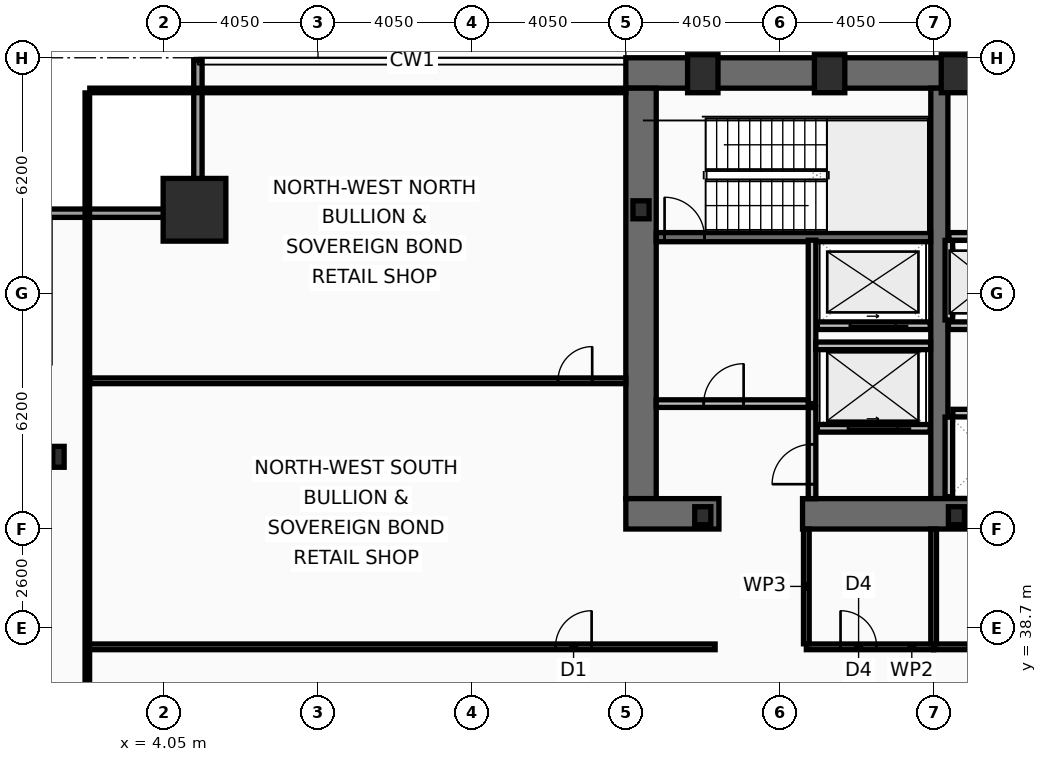
"""IFC4 building model, lengths in metres.
Left out: names, types, materials, properties, quantities, classifications, styles, units other than length and angle.
Written with IfcOpenShell. Run it as: python <this file> out.ifc"""

import sys

from ifc_helpers import new_model, si_unit, direction, frame, frame_2d, origin, origin_2d, place, context, subcontext, project, spatial, rectangle, hollow_rectangle, i_section, extrude, element, fill, save


model = new_model("IFC4")
c1 = context("Model", 3, precision=1e-05, world=origin(), true_north=direction((0.0, 1.0)))
c2 = subcontext(c1, "Body", "Model", "MODEL_VIEW")
j1 = project(units=[si_unit("LENGTHUNIT", "METRE"), si_unit("PLANEANGLEUNIT", "RADIAN")], contexts=[c1])
p1 = place(None, origin())
s1 = spatial("IfcSite", under=j1, at=p1, CompositionType="ELEMENT")
p2 = place(p1, origin())
s2 = spatial("IfcBuilding", under=s1, at=p2, CompositionType="ELEMENT")
p3 = place(p2, frame((0.0, 0.0, 65.8)))
s3 = spatial("IfcBuildingStorey", under=s2, at=p3, CompositionType="ELEMENT", Elevation=65.8)
p4 = place(p3, frame((16.2, 53.3, 0.0), z_axis=(0.0, 0.0, 1.0), x_axis=(1.0, 0.0, 0.0)))
e1 = element("IfcWall", 1, at=p4, inside=s3, PredefinedType="SHEAR", context=c2, shape_type="SweptSolid", body=[
    extrude(rectangle(XDim=40.5, YDim=0.8, at=frame_2d((20.25, 0.0))), origin(), (0.0, 0.0, 1.0), 3.82),
])
p5 = place(p3, frame((16.6, 42.1, 0.0), z_axis=(0.0, 0.0, 1.0), x_axis=(0.0, 1.0, 0.0)))
e2 = element("IfcWall", 2, at=p5, inside=s3, PredefinedType="SHEAR", context=c2, shape_type="SweptSolid", body=[
    extrude(rectangle(XDim=10.8, YDim=0.8, at=frame_2d((5.4, 0.0))), origin(), (0.0, 0.0, 1.0), 3.82),
])
p6 = place(p3, frame((24.45, 42.1, 0.0), z_axis=(0.0, 0.0, 1.0), x_axis=(0.0, 1.0, 0.0)))
e3 = element("IfcWall", 3, at=p6, inside=s3, PredefinedType="SHEAR", context=c2, shape_type="SweptSolid", body=[
    extrude(rectangle(XDim=10.8, YDim=0.45, at=frame_2d((5.4, 0.0))), origin(), (0.0, 0.0, 1.0), 3.82),
])
p7 = place(p3, frame((18.65, 41.7, 0.0), z_axis=(0.0, 0.0, 1.0), x_axis=(-1.0, 0.0, 0.0)))
e4 = element("IfcWall", 4, at=p7, inside=s3, PredefinedType="SHEAR", context=c2, shape_type="SweptSolid", body=[
    extrude(rectangle(XDim=2.45, YDim=0.8, at=frame_2d((1.225, 0.0))), origin(), (0.0, 0.0, 1.0), 3.82),
])
p8 = place(p3, frame((32.3, 41.7, 0.0), z_axis=(0.0, 0.0, 1.0), x_axis=(-1.0, 0.0, 0.0)))
e5 = element("IfcWall", 5, at=p8, inside=s3, PredefinedType="SHEAR", context=c2, shape_type="SweptSolid", body=[
    extrude(rectangle(XDim=11.45, YDim=0.8, at=frame_2d((5.725, 0.0))), origin(), (0.0, 0.0, 1.0), 3.82),
])
p9 = place(p3, frame((17.0, 48.98, 0.0), z_axis=(0.0, 0.0, 1.0), x_axis=(1.0, 0.0, 0.0)))
e6 = element("IfcWall", 6, at=p9, inside=s3, PredefinedType="SHEAR", context=c2, shape_type="SweptSolid", body=[
    extrude(rectangle(XDim=7.22, YDim=0.24, at=frame_2d((3.61, 0.0))), origin(), (0.0, 0.0, 1.0), 3.82),
])
p10 = place(p9, frame((0.22, 0.0, 0.0)))
e7 = element("IfcOpeningElement", 7, at=p10, cuts=e6, PredefinedType="OPENING", context=c2, shape_type="SweptSolid", body=[
    extrude(rectangle(XDim=1.05, YDim=2.15, at=frame_2d((0.525, 1.075))), frame((0.0, 0.13, 0.0), z_axis=(0.0, -1.0, 0.0), x_axis=(1.0, 0.0, 0.0)), (0.0, 0.0, 1.0), 0.26),
])
p11 = place(p3, frame((4.85, 49.7, 0.0), z_axis=(0.0, 0.0, 1.0), x_axis=(1.0, 0.0, 0.0)))
e8 = element("IfcColumn", 8, at=p11, inside=s3, PredefinedType="COLUMN", context=c2, shape_type="SweptSolid", body=[
    extrude(hollow_rectangle(XDim=1.65, YDim=1.65, WallThickness=0.075, at=origin_2d()), origin(), (0.0, 0.0, 1.0), 4.0),
])
for number, where, z_axis, x_axis in (
    (9, (18.225, 53.28, 0.0), (0.0, 0.0, 1.0), (1.0, 0.0, 0.0)),
    (10, (21.562, 53.28, 0.0), (0.0, 0.0, 1.0), (1.0, 0.0, 0.0)),
    (11, (24.9, 53.28, 0.0), (0.0, 0.0, 1.0), (1.0, 0.0, 0.0)),
):
    element("IfcColumn", number, at=place(p3, frame(where, z_axis=z_axis, x_axis=x_axis)), inside=s3, PredefinedType="COLUMN", context=c2, shape_type="SweptSolid", body=[
        extrude(hollow_rectangle(XDim=0.8, YDim=1.0, WallThickness=0.055, at=origin_2d()), origin(), (0.0, 0.0, 1.0), 4.0),
    ])
p12 = place(p3, frame((1.27, 43.2, 0.0), z_axis=(0.0, 0.0, 1.0), x_axis=(1.0, 0.0, 0.0)))
e12 = element("IfcColumn", 12, at=p12, inside=s3, PredefinedType="COLUMN", context=c2, shape_type="SweptSolid", body=[
    extrude(i_section(OverallWidth=0.3, OverallDepth=0.55, WebThickness=0.015, FlangeThickness=0.029, at=origin_2d()), origin(), (0.0, 0.0, 1.0), 4.0),
])
for number, where, z_axis, x_axis in (
    (13, (16.6, 49.7, 0.0), (0.0, 0.0, 1.0), (1.0, 0.0, 0.0)),
    (14, (18.225, 41.65, 0.0), (0.0, 0.0, 1.0), (1.0, 0.0, 0.0)),
    (15, (24.9, 41.65, 0.0), (0.0, 0.0, 1.0), (1.0, 0.0, 0.0)),
):
    element("IfcColumn", number, at=place(p3, frame(where, z_axis=z_axis, x_axis=x_axis)), inside=s3, PredefinedType="COLUMN", context=c2, shape_type="SweptSolid", body=[
        extrude(i_section(OverallWidth=0.424, OverallDepth=0.474, WebThickness=0.048, FlangeThickness=0.077, at=origin_2d()), origin(), (0.0, 0.0, 1.0), 4.0),
    ])
p13 = place(p3, frame((0.83, 49.61, 0.0), z_axis=(0.0, 0.0, 1.0), x_axis=(1.0, 0.0, 0.0)))
e16 = element("IfcWall", 16, at=p13, inside=s3, PredefinedType="SOLIDWALL", context=c2, shape_type="SweptSolid", body=[
    extrude(rectangle(XDim=4.22, YDim=0.22, at=frame_2d((2.11, 0.0))), origin(), (0.0, 0.0, 1.0), 3.16),
])
p14 = place(p3, frame((4.94, 49.72, 0.0), z_axis=(0.0, 0.0, 1.0), x_axis=(0.0, 1.0, 0.0)))
e17 = element("IfcWall", 17, at=p14, inside=s3, PredefinedType="SOLIDWALL", context=c2, shape_type="SweptSolid", body=[
    extrude(rectangle(XDim=3.91, YDim=0.22, at=frame_2d((1.955, 0.0))), origin(), (0.0, 0.0, 1.0), 3.16),
])
p15 = place(p3, frame((24.21, 43.95, 0.0), z_axis=(0.0, 0.0, 1.0), x_axis=(-1.0, 0.0, 0.0)))
e18 = element("IfcWall", 18, at=p15, inside=s3, PredefinedType="PARTITIONING", context=c2, shape_type="SweptSolid", body=[
    extrude(rectangle(XDim=2.97, YDim=0.2, at=frame_2d((1.485, 0.0))), origin(), (0.0, 0.0, 1.0), 3.82),
])
p16 = place(p15, frame((0.86, 0.0, 0.0)))
e19 = element("IfcOpeningElement", 19, at=p16, cuts=e18, PredefinedType="OPENING", context=c2, shape_type="SweptSolid", body=[
    extrude(rectangle(XDim=1.3, YDim=2.18, at=frame_2d((0.65, 1.09))), frame((0.0, 0.11, 0.0), z_axis=(0.0, -1.0, 0.0), x_axis=(1.0, 0.0, 0.0)), (0.0, 0.0, 1.0), 0.22),
])
p17 = place(p3, frame((24.21, 46.65, 0.0), z_axis=(0.0, 0.0, 1.0), x_axis=(-1.0, 0.0, 0.0)))
e20 = element("IfcWall", 20, at=p17, inside=s3, PredefinedType="PARTITIONING", context=c2, shape_type="SweptSolid", body=[
    extrude(rectangle(XDim=2.97, YDim=0.2, at=frame_2d((1.485, 0.0))), origin(), (0.0, 0.0, 1.0), 3.82),
])
p18 = place(p17, frame((0.91, 0.0, 0.0)))
e21 = element("IfcOpeningElement", 21, at=p18, cuts=e20, PredefinedType="OPENING", context=c2, shape_type="SweptSolid", body=[
    extrude(rectangle(XDim=1.2, YDim=2.18, at=frame_2d((0.6, 1.09))), frame((0.0, 0.11, 0.0), z_axis=(0.0, -1.0, 0.0), x_axis=(1.0, 0.0, 0.0)), (0.0, 0.0, 1.0), 0.22),
])
p19 = place(p3, frame((31.22, 46.65, 0.0), z_axis=(0.0, 0.0, 1.0), x_axis=(-1.0, 0.0, 0.0)))
e22 = element("IfcWall", 22, at=p19, inside=s3, PredefinedType="PARTITIONING", context=c2, shape_type="SweptSolid", body=[
    extrude(rectangle(XDim=6.53, YDim=0.2, at=frame_2d((3.265, 0.0))), origin(), (0.0, 0.0, 1.0), 3.82),
])
p20 = place(p19, frame((4.9, 0.0, 0.0)))
e23 = element("IfcOpeningElement", 23, at=p20, cuts=e22, PredefinedType="OPENING", context=c2, shape_type="SweptSolid", body=[
    extrude(rectangle(XDim=1.1, YDim=2.18, at=frame_2d((0.55, 1.09))), frame((0.0, 0.11, 0.0), z_axis=(0.0, -1.0, 0.0), x_axis=(1.0, 0.0, 0.0)), (0.0, 0.0, 1.0), 0.22),
])
p21 = place(p19, frame((2.74, 0.0, 0.0)))
e24 = element("IfcOpeningElement", 24, at=p21, cuts=e22, PredefinedType="OPENING", context=c2, shape_type="SweptSolid", body=[
    extrude(rectangle(XDim=1.1, YDim=2.18, at=frame_2d((0.55, 1.09))), frame((0.0, 0.11, 0.0), z_axis=(0.0, -1.0, 0.0), x_axis=(1.0, 0.0, 0.0)), (0.0, 0.0, 1.0), 0.22),
])
p22 = place(p19, frame((0.58, 0.0, 0.0)))
e25 = element("IfcOpeningElement", 25, at=p22, cuts=e22, PredefinedType="OPENING", context=c2, shape_type="SweptSolid", body=[
    extrude(rectangle(XDim=1.1, YDim=2.18, at=frame_2d((0.55, 1.09))), frame((0.0, 0.11, 0.0), z_axis=(0.0, -1.0, 0.0), x_axis=(1.0, 0.0, 0.0)), (0.0, 0.0, 1.0), 0.22),
])
p23 = place(p3, frame((21.1, 44.6, 0.0), z_axis=(0.0, 0.0, 1.0), x_axis=(0.0, 1.0, 0.0)))
e26 = element("IfcWall", 26, at=p23, inside=s3, PredefinedType="PARTITIONING", context=c2, shape_type="SweptSolid", body=[
    extrude(rectangle(XDim=4.3, YDim=0.2, at=frame_2d((2.15, 0.0))), origin(), (0.0, 0.0, 1.0), 3.82),
])
p24 = place(p3, frame((17.0, 44.6, 0.0), z_axis=(0.0, 0.0, 1.0), x_axis=(1.0, 0.0, 0.0)))
e27 = element("IfcWall", 27, at=p24, inside=s3, PredefinedType="PARTITIONING", context=c2, shape_type="SweptSolid", body=[
    extrude(rectangle(XDim=4.0, YDim=0.2, at=frame_2d((2.0, 0.0))), origin(), (0.0, 0.0, 1.0), 3.82),
])
p25 = place(p24, frame((1.25, 0.0, 0.0)))
e28 = element("IfcOpeningElement", 28, at=p25, cuts=e27, PredefinedType="OPENING", context=c2, shape_type="SweptSolid", body=[
    extrude(rectangle(XDim=1.05, YDim=2.15, at=frame_2d((0.525, 1.075))), frame((0.0, 0.11, 0.0), z_axis=(0.0, -1.0, 0.0), x_axis=(1.0, 0.0, 0.0)), (0.0, 0.0, 1.0), 0.22),
])
p26 = place(p3, frame((21.2, 46.12, 0.0), z_axis=(0.0, 0.0, 1.0), x_axis=(1.0, 0.0, 0.0)))
e29 = element("IfcWall", 29, at=p26, inside=s3, PredefinedType="PARTITIONING", context=c2, shape_type="SweptSolid", body=[
    extrude(rectangle(XDim=3.02, YDim=0.2, at=frame_2d((1.51, 0.0))), origin(), (0.0, 0.0, 1.0), 3.82),
])
p27 = place(p3, frame((21.1, 42.1, 0.0), z_axis=(0.0, 0.0, 1.0), x_axis=(0.0, 1.0, 0.0)))
e30 = element("IfcWall", 30, at=p27, inside=s3, PredefinedType="PARTITIONING", context=c2, shape_type="SweptSolid", body=[
    extrude(rectangle(XDim=2.395, YDim=0.2, at=frame_2d((1.198, 0.0))), origin(), (0.0, 0.0, 1.0), 3.82),
])
p28 = place(p27, frame((0.38, 0.0, 0.0)))
e31 = element("IfcOpeningElement", 31, at=p28, cuts=e30, PredefinedType="OPENING", context=c2, shape_type="SweptSolid", body=[
    extrude(rectangle(XDim=1.05, YDim=2.15, at=frame_2d((0.525, 1.075))), frame((0.0, 0.11, 0.0), z_axis=(0.0, -1.0, 0.0), x_axis=(1.0, 0.0, 0.0)), (0.0, 0.0, 1.0), 0.22),
])
p29 = place(p3, frame((24.7, 46.8, 0.0), z_axis=(0.0, 0.0, 1.0), x_axis=(0.0, 1.0, 0.0)))
e32 = element("IfcWall", 32, at=p29, inside=s3, PredefinedType="PARTITIONING", context=c2, shape_type="SweptSolid", body=[
    extrude(rectangle(XDim=2.095, YDim=0.2, at=frame_2d((1.047, 0.0))), origin(), (0.0, 0.0, 1.0), 3.82),
])
p30 = place(p3, frame((24.805, 44.35, 0.0), z_axis=(0.0, 0.0, 1.0), x_axis=(1.0, 0.0, 0.0)))
e33 = element("IfcWall", 33, at=p30, inside=s3, PredefinedType="PARTITIONING", context=c2, shape_type="SweptSolid", body=[
    extrude(rectangle(XDim=6.27, YDim=0.2, at=frame_2d((3.135, 0.0))), origin(), (0.0, 0.0, 1.0), 3.82),
])
p31 = place(p3, frame((24.7, 42.15, 0.0), z_axis=(0.0, 0.0, 1.0), x_axis=(0.0, 1.0, 0.0)))
e34 = element("IfcWall", 34, at=p31, inside=s3, PredefinedType="PARTITIONING", context=c2, shape_type="SweptSolid", body=[
    extrude(rectangle(XDim=2.095, YDim=0.2, at=frame_2d((1.048, 0.0))), origin(), (0.0, 0.0, 1.0), 3.82),
])
p32 = place(p3, frame((24.7, 52.86, 0.0), z_axis=(0.0, 0.0, 1.0), x_axis=(1.0, 0.0, 0.0)))
e35 = element("IfcWall", 35, at=p32, inside=s3, PredefinedType="PARTITIONING", context=c2, shape_type="SweptSolid", body=[
    extrude(rectangle(XDim=7.72, YDim=0.12, at=frame_2d((3.86, 0.0))), origin(), (0.0, 0.0, 1.0), 3.82),
])
p33 = place(p3, frame((24.7, 49.0, 0.0), z_axis=(0.0, 0.0, 1.0), x_axis=(1.0, 0.0, 0.0)))
e36 = element("IfcWall", 36, at=p33, inside=s3, PredefinedType="PARTITIONING", context=c2, shape_type="SweptSolid", body=[
    extrude(rectangle(XDim=7.72, YDim=0.2, at=frame_2d((3.86, 0.0))), origin(), (0.0, 0.0, 1.0), 3.82),
])
p34 = place(p33, frame((6.56, 0.0, 0.0)))
e37 = element("IfcOpeningElement", 37, at=p34, cuts=e36, PredefinedType="OPENING", context=c2, shape_type="SweptSolid", body=[
    extrude(rectangle(XDim=0.95, YDim=2.1, at=frame_2d((0.475, 1.05))), frame((0.0, 0.11, 0.0), z_axis=(0.0, -1.0, 0.0), x_axis=(1.0, 0.0, 0.0)), (0.0, 0.0, 1.0), 0.22),
])
p35 = place(p3, frame((20.95, 38.2, 0.0), z_axis=(0.0, 0.0, 1.0), x_axis=(1.0, 0.0, 0.0)))
e38 = element("IfcWall", 38, at=p35, inside=s3, PredefinedType="PARTITIONING", context=c2, shape_type="SweptSolid", body=[
    extrude(rectangle(XDim=3.35, YDim=0.15, at=frame_2d((1.675, 0.0))), origin(), (0.0, 0.0, 1.0), 3.82),
])
p36 = place(p35, frame((0.9, 0.0, 0.0)))
e39 = element("IfcOpeningElement", 39, at=p36, cuts=e38, PredefinedType="OPENING", context=c2, shape_type="SweptSolid", body=[
    extrude(rectangle(XDim=0.95, YDim=2.05, at=frame_2d((0.475, 1.025))), frame((0.0, 0.085, 0.0), z_axis=(0.0, -1.0, 0.0), x_axis=(1.0, 0.0, 0.0)), (0.0, 0.0, 1.0), 0.17),
])
p37 = place(p3, frame((24.3, 38.2, 0.0), z_axis=(0.0, 0.0, 1.0), x_axis=(1.0, 0.0, 0.0)))
e40 = element("IfcWall", 40, at=p37, inside=s3, PredefinedType="PARTITIONING", context=c2, shape_type="SweptSolid", body=[
    extrude(rectangle(XDim=4.9, YDim=0.15, at=frame_2d((2.45, 0.0))), origin(), (0.0, 0.0, 1.0), 3.01),
])
p38 = place(p37, frame((0.9, 0.0, 0.0)))
e41 = element("IfcOpeningElement", 41, at=p38, cuts=e40, PredefinedType="OPENING", context=c2, shape_type="SweptSolid", body=[
    extrude(rectangle(XDim=0.95, YDim=2.05, at=frame_2d((0.475, 1.025))), frame((0.0, 0.085, 0.0), z_axis=(0.0, -1.0, 0.0), x_axis=(1.0, 0.0, 0.0)), (0.0, 0.0, 1.0), 0.17),
])
for number, where, z_axis, x_axis in (
    (42, (20.95, 38.28, 0.0), (0.0, 0.0, 1.0), (0.0, 1.0, 0.0)),
    (43, (24.3, 38.28, 0.0), (0.0, 0.0, 1.0), (0.0, 1.0, 0.0)),
):
    element("IfcWall", number, at=place(p3, frame(where, z_axis=z_axis, x_axis=x_axis)), inside=s3, PredefinedType="PARTITIONING", context=c2, shape_type="SweptSolid", body=[
        extrude(rectangle(XDim=3.02, YDim=0.15, at=frame_2d((1.51, 0.0))), origin(), (0.0, 0.0, 1.0), 3.82),
    ])
p39 = place(p3, frame((2.03, 38.2, 0.0), z_axis=(0.0, 0.0, 1.0), x_axis=(1.0, 0.0, 0.0)))
e44 = element("IfcWall", 44, at=p39, inside=s3, PredefinedType="PARTITIONING", context=c2, shape_type="SweptSolid", body=[
    extrude(rectangle(XDim=16.52, YDim=0.15, at=frame_2d((8.26, 0.0))), origin(), (0.0, 0.0, 1.0), 3.01),
])
p40 = place(p39, frame((12.32, 0.0, 0.0)))
e45 = element("IfcOpeningElement", 45, at=p40, cuts=e44, PredefinedType="OPENING", context=c2, shape_type="SweptSolid", body=[
    extrude(rectangle(XDim=0.95, YDim=2.05, at=frame_2d((0.475, 1.025))), frame((0.0, 0.085, 0.0), z_axis=(0.0, -1.0, 0.0), x_axis=(1.0, 0.0, 0.0)), (0.0, 0.0, 1.0), 0.17),
])
p41 = place(p3, frame((2.095, 45.2, 0.0), z_axis=(0.0, 0.0, 1.0), x_axis=(1.0, 0.0, 0.0)))
e46 = element("IfcWall", 46, at=p41, inside=s3, PredefinedType="PARTITIONING", context=c2, shape_type="SweptSolid", body=[
    extrude(rectangle(XDim=14.105, YDim=0.15, at=frame_2d((7.052, 0.0))), origin(), (0.0, 0.0, 1.0), 3.16),
])
p42 = place(p41, frame((12.32, 0.0, 0.0)))
e47 = element("IfcOpeningElement", 47, at=p42, cuts=e46, PredefinedType="OPENING", context=c2, shape_type="SweptSolid", body=[
    extrude(rectangle(XDim=0.9, YDim=2.05, at=frame_2d((0.45, 1.025))), frame((0.0, 0.085, 0.0), z_axis=(0.0, -1.0, 0.0), x_axis=(1.0, 0.0, 0.0)), (0.0, 0.0, 1.0), 0.17),
])
p43 = place(p3, frame((2.03, 10.665, 0.0), z_axis=(0.0, 0.0, 1.0), x_axis=(0.0, 1.0, 0.0)))
e48 = element("IfcWall", 48, at=p43, inside=s3, PredefinedType="PARTITIONING", context=c2, shape_type="SweptSolid", body=[
    extrude(rectangle(XDim=42.11, YDim=0.12, at=frame_2d((21.055, 0.0))), origin(), (0.0, 0.0, 1.0), 3.01),
])
p44 = place(p3, frame((2.095, 52.84, 0.0), z_axis=(0.0, 0.0, 1.0), x_axis=(1.0, 0.0, 0.0)))
e49 = element("IfcWall", 49, at=p44, inside=s3, PredefinedType="PARTITIONING", context=c2, shape_type="SweptSolid", body=[
    extrude(rectangle(XDim=14.105, YDim=0.12, at=frame_2d((7.052, 0.0))), origin(), (0.0, 0.0, 1.0), 3.82),
])
p45 = place(p10, origin())
e50 = element("IfcDoor", 50, at=p45, inside=s3, OperationType="SINGLE_SWING_LEFT", PredefinedType="DOOR", context=c2, shape_type="SweptSolid", body=[
    extrude(rectangle(XDim=1.05, YDim=2.15, at=frame_2d((0.525, 1.075))), frame((0.0, 0.025, 0.0), z_axis=(0.0, -1.0, 0.0), x_axis=(1.0, 0.0, 0.0)), (0.0, 0.0, 1.0), 0.05),
])
fill(e7, e50)
p46 = place(p16, origin())
e51 = element("IfcDoor", 51, at=p46, inside=s3, OperationType="SLIDING_TO_LEFT", PredefinedType="DOOR", context=c2, shape_type="SweptSolid", body=[
    extrude(rectangle(XDim=1.3, YDim=2.18, at=frame_2d((0.65, 1.09))), frame((0.0, 0.025, 0.0), z_axis=(0.0, -1.0, 0.0), x_axis=(1.0, 0.0, 0.0)), (0.0, 0.0, 1.0), 0.05),
])
fill(e19, e51)
p47 = place(p18, origin())
e52 = element("IfcDoor", 52, at=p47, inside=s3, OperationType="SLIDING_TO_LEFT", PredefinedType="DOOR", context=c2, shape_type="SweptSolid", body=[
    extrude(rectangle(XDim=1.2, YDim=2.18, at=frame_2d((0.6, 1.09))), frame((0.0, 0.025, 0.0), z_axis=(0.0, -1.0, 0.0), x_axis=(1.0, 0.0, 0.0)), (0.0, 0.0, 1.0), 0.05),
])
fill(e21, e52)
p48 = place(p25, origin())
e53 = element("IfcDoor", 53, at=p48, inside=s3, OperationType="SINGLE_SWING_RIGHT", PredefinedType="DOOR", context=c2, shape_type="SweptSolid", body=[
    extrude(rectangle(XDim=1.05, YDim=2.15, at=frame_2d((0.525, 1.075))), frame((0.0, 0.025, 0.0), z_axis=(0.0, -1.0, 0.0), x_axis=(1.0, 0.0, 0.0)), (0.0, 0.0, 1.0), 0.05),
])
fill(e28, e53)
p49 = place(p28, origin())
e54 = element("IfcDoor", 54, at=p49, inside=s3, OperationType="SINGLE_SWING_LEFT", PredefinedType="DOOR", context=c2, shape_type="SweptSolid", body=[
    extrude(rectangle(XDim=1.05, YDim=2.15, at=frame_2d((0.525, 1.075))), frame((0.0, 0.025, 0.0), z_axis=(0.0, -1.0, 0.0), x_axis=(1.0, 0.0, 0.0)), (0.0, 0.0, 1.0), 0.05),
])
fill(e31, e54)
p50 = place(p36, origin())
e55 = element("IfcDoor", 55, at=p50, inside=s3, OperationType="SINGLE_SWING_LEFT", PredefinedType="DOOR", context=c2, shape_type="SweptSolid", body=[
    extrude(rectangle(XDim=0.95, YDim=2.05, at=frame_2d((0.475, 1.025))), frame((0.0, 0.025, 0.0), z_axis=(0.0, -1.0, 0.0), x_axis=(1.0, 0.0, 0.0)), (0.0, 0.0, 1.0), 0.05),
])
fill(e39, e55)
p51 = place(p40, origin())
e56 = element("IfcDoor", 56, at=p51, inside=s3, OperationType="SINGLE_SWING_RIGHT", PredefinedType="DOOR", context=c2, shape_type="SweptSolid", body=[
    extrude(rectangle(XDim=0.95, YDim=2.05, at=frame_2d((0.475, 1.025))), frame((0.0, 0.025, 0.0), z_axis=(0.0, -1.0, 0.0), x_axis=(1.0, 0.0, 0.0)), (0.0, 0.0, 1.0), 0.05),
])
fill(e45, e56)
p52 = place(p42, origin())
e57 = element("IfcDoor", 57, at=p52, inside=s3, OperationType="SINGLE_SWING_RIGHT", PredefinedType="DOOR", context=c2, shape_type="SweptSolid", body=[
    extrude(rectangle(XDim=0.9, YDim=2.05, at=frame_2d((0.45, 1.025))), frame((0.0, 0.025, 0.0), z_axis=(0.0, -1.0, 0.0), x_axis=(1.0, 0.0, 0.0)), (0.0, 0.0, 1.0), 0.05),
])
fill(e47, e57)
save(model, sys.argv[1])
